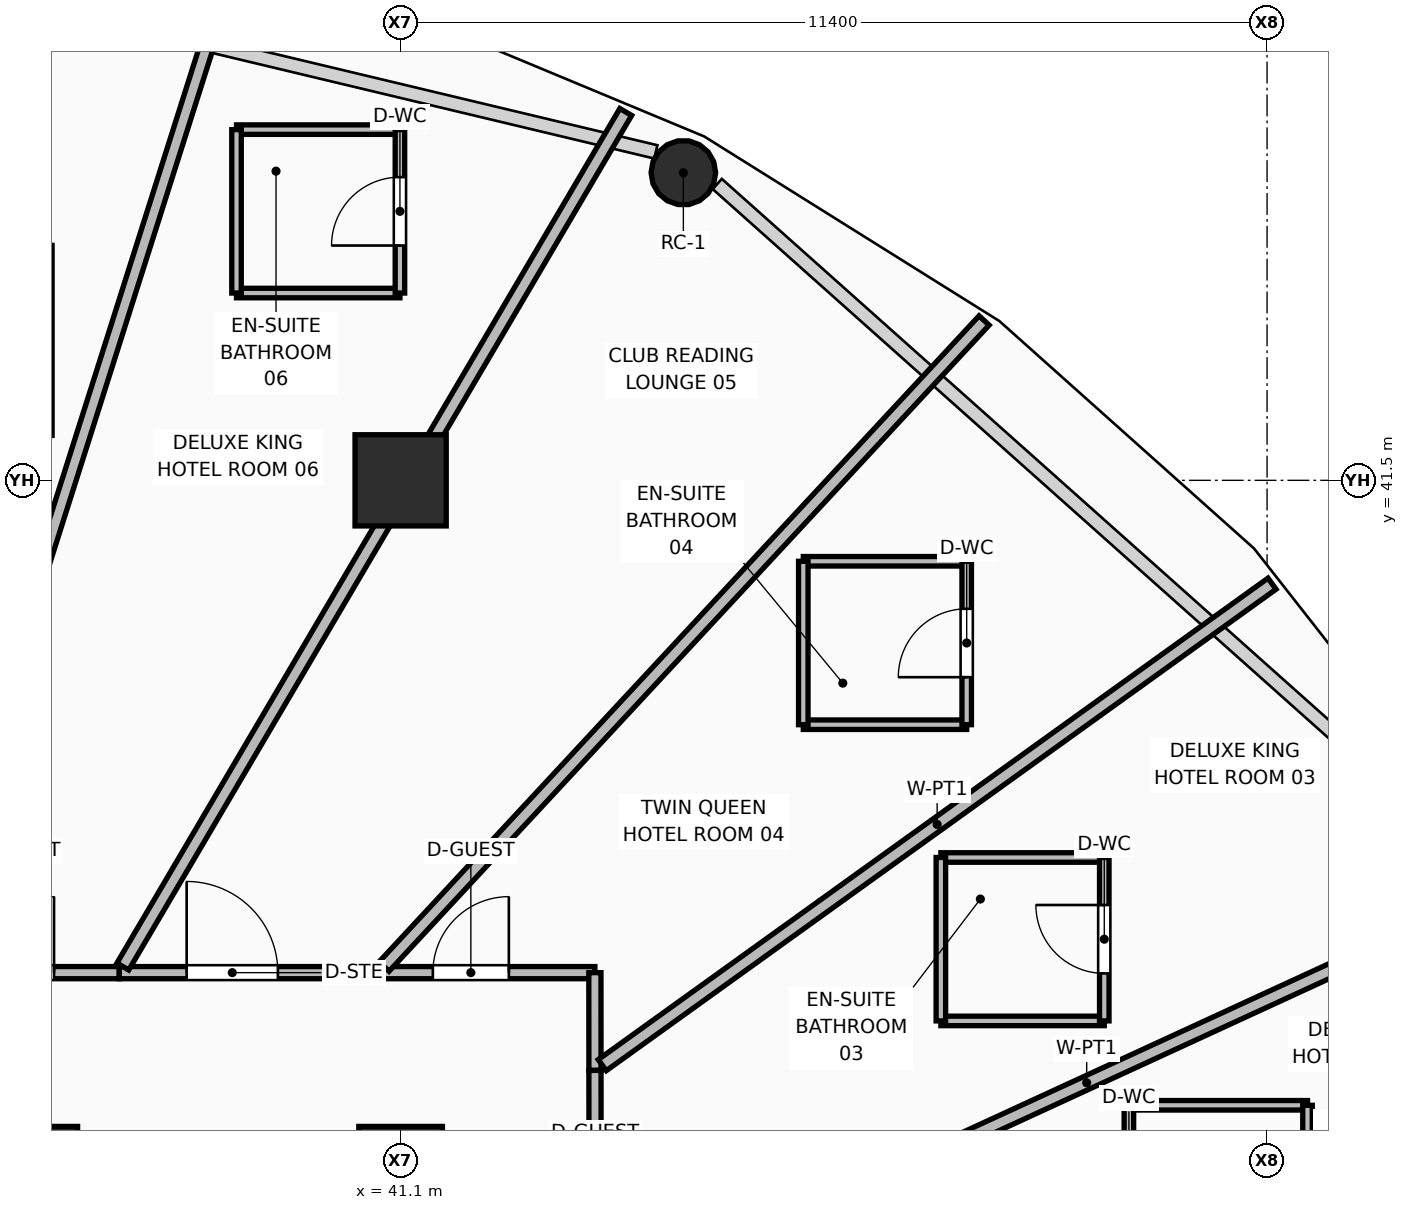
"""IFC4 building model, lengths in metres.
Left out: names, types, materials, properties, quantities, classifications, styles, units other than length and angle.
Written with IfcOpenShell. Run it as: python <this file> out.ifc"""

import sys

from ifc_helpers import new_model, si_unit, direction, frame, frame_2d, origin, origin_2d, place, context, subcontext, project, spatial, rectangle, hollow_rectangle, hollow_circle, extrude, element, fill, save


model = new_model("IFC4")
c1 = context("Model", 3, precision=1e-05, world=origin(), true_north=direction((0.0, 1.0)))
c2 = subcontext(c1, "Body", "Model", "MODEL_VIEW")
j1 = project(units=[si_unit("LENGTHUNIT", "METRE"), si_unit("PLANEANGLEUNIT", "RADIAN")], contexts=[c1])
p1 = place(None, origin())
s1 = spatial("IfcSite", under=j1, at=p1, CompositionType="ELEMENT")
p2 = place(p1, origin())
s2 = spatial("IfcBuilding", under=s1, at=p2, CompositionType="ELEMENT")
p3 = place(p2, frame((0.0, 0.0, 53.25)))
s3 = spatial("IfcBuildingStorey", under=s2, at=p3, CompositionType="ELEMENT", Elevation=53.25)
for number, where, z_axis, x_axis in (
    (1, (36.3, 32.45, 0.0), (0.0, 0.0, 1.0), (1.0, 0.0, 0.0)),
    (2, (41.1, 32.45, 0.0), (0.0, 0.0, 1.0), (1.0, 0.0, 0.0)),
):
    element("IfcColumn", number, at=place(p3, frame(where, z_axis=z_axis, x_axis=x_axis)), inside=s3, PredefinedType="COLUMN", context=c2, shape_type="SweptSolid", body=[
        extrude(rectangle(XDim=1.1, YDim=1.1, at=origin_2d()), origin(), (0.0, 0.0, 1.0), 3.75),
    ])
p4 = place(p3, frame((41.1, 41.5, 0.0), z_axis=(0.0, 0.0, 1.0), x_axis=(1.0, 0.0, 0.0)))
e3 = element("IfcColumn", 3, at=p4, inside=s3, PredefinedType="COLUMN", context=c2, shape_type="SweptSolid", body=[
    extrude(hollow_rectangle(XDim=1.2, YDim=1.2, WallThickness=0.045, at=origin_2d()), origin(), (0.0, 0.0, 1.0), 3.75),
])
p5 = place(p3, frame((44.82, 45.547, 0.0), z_axis=(0.111309599924, 0.172151708361, 0.978761442985), x_axis=(-0.839754063035, 0.542966954443, 0.0)))
e4 = element("IfcColumn", 4, at=p5, inside=s3, PredefinedType="COLUMN", context=c2, shape_type="SweptSolid", body=[
    extrude(hollow_circle(Radius=0.425, WallThickness=0.04, at=origin_2d()), origin(), (0.0, 0.0, 1.0), 3.647),
])
p6 = place(p3, frame((34.681, 35.023, 0.0), z_axis=(0.0, 0.0, 1.0), x_axis=(1.0, 0.0, 0.0)))
e5 = element("IfcWall", 5, at=p6, inside=s3, PredefinedType="PARTITIONING", context=c2, shape_type="SweptSolid", body=[
    extrude(rectangle(XDim=2.717, YDim=0.16, at=frame_2d((1.358, 0.0))), origin(), (0.0, 0.0, 1.0), 3.55),
])
p7 = place(p6, frame((0.859, 0.0, 0.0)))
e6 = element("IfcOpeningElement", 6, at=p7, cuts=e5, PredefinedType="OPENING", context=c2, shape_type="SweptSolid", body=[
    extrude(rectangle(XDim=1.0, YDim=2.1, at=frame_2d((0.5, 1.05))), frame((0.0, 0.09, 0.0), z_axis=(0.0, -1.0, 0.0), x_axis=(1.0, 0.0, 0.0)), (0.0, 0.0, 1.0), 0.18),
])
p8 = place(p3, frame((37.398, 35.023, 0.0), z_axis=(0.0, 0.0, 1.0), x_axis=(1.0, 0.0, 0.0)))
e7 = element("IfcWall", 7, at=p8, inside=s3, PredefinedType="PARTITIONING", context=c2, shape_type="SweptSolid", body=[
    extrude(rectangle(XDim=3.41, YDim=0.16, at=frame_2d((1.705, 0.0))), origin(), (0.0, 0.0, 1.0), 3.55),
])
p9 = place(p8, frame((0.887, 0.0, 0.0)))
e8 = element("IfcOpeningElement", 8, at=p9, cuts=e7, PredefinedType="OPENING", context=c2, shape_type="SweptSolid", body=[
    extrude(rectangle(XDim=1.2, YDim=2.1, at=frame_2d((0.6, 1.05))), frame((0.0, 0.09, 0.0), z_axis=(0.0, -1.0, 0.0), x_axis=(1.0, 0.0, 0.0)), (0.0, 0.0, 1.0), 0.18),
])
p10 = place(p3, frame((40.808, 35.023, 0.0), z_axis=(0.0, 0.0, 1.0), x_axis=(1.0, 0.0, 0.0)))
e9 = element("IfcWall", 9, at=p10, inside=s3, PredefinedType="PARTITIONING", context=c2, shape_type="SweptSolid", body=[
    extrude(rectangle(XDim=2.848, YDim=0.16, at=frame_2d((1.424, 0.0))), origin(), (0.0, 0.0, 1.0), 2.928),
])
p11 = place(p10, frame((0.716, 0.0, 0.0)))
e10 = element("IfcOpeningElement", 10, at=p11, cuts=e9, PredefinedType="OPENING", context=c2, shape_type="SweptSolid", body=[
    extrude(rectangle(XDim=1.0, YDim=2.1, at=frame_2d((0.5, 1.05))), frame((0.0, 0.09, 0.0), z_axis=(0.0, -1.0, 0.0), x_axis=(1.0, 0.0, 0.0)), (0.0, 0.0, 1.0), 0.18),
])
p12 = place(p3, frame((43.656, 35.023, 0.0), z_axis=(0.0, 0.0, 1.0), x_axis=(0.000759445386, -0.999999711621, 0.0)))
e11 = element("IfcWall", 11, at=p12, inside=s3, PredefinedType="PARTITIONING", context=c2, shape_type="SweptSolid", body=[
    extrude(rectangle(XDim=1.286, YDim=0.16, at=frame_2d((0.643, 0.0))), origin(), (0.0, 0.0, 1.0), 3.55),
])
p13 = place(p3, frame((43.657, 33.737, 0.0), z_axis=(0.0, 0.0, 1.0), x_axis=(0.000933270709, -0.999999564503, 0.0)))
e12 = element("IfcWall", 12, at=p13, inside=s3, PredefinedType="PARTITIONING", context=c2, shape_type="SweptSolid", body=[
    extrude(rectangle(XDim=3.139, YDim=0.16, at=frame_2d((1.57, 0.0))), origin(), (0.0, 0.0, 1.0), 2.928),
])
p14 = place(p13, frame((1.559, 0.0, 0.0)))
e13 = element("IfcOpeningElement", 13, at=p14, cuts=e12, PredefinedType="OPENING", context=c2, shape_type="SweptSolid", body=[
    extrude(rectangle(XDim=1.0, YDim=2.1, at=frame_2d((0.5, 1.05))), frame((0.0, 0.09, 0.0), z_axis=(0.0, -1.0, 0.0), x_axis=(1.0, 0.0, 0.0)), (0.0, 0.0, 1.0), 0.18),
])
p15 = place(p3, frame((43.753, 30.64, 0.0), z_axis=(0.0, 0.0, 1.0), x_axis=(0.908354532473, 0.418200960466, 0.0)))
e14 = element("IfcWall", 14, at=p15, inside=s3, PredefinedType="PARTITIONING", context=c2, shape_type="SweptSolid", body=[
    extrude(rectangle(XDim=12.934, YDim=0.18, at=frame_2d((6.467, 0.0))), origin(), (0.0, 0.0, 1.0), 2.775),
])
p16 = place(p3, frame((43.753, 33.806, 0.0), z_axis=(0.0, 0.0, 1.0), x_axis=(0.812000044836, 0.583657371397, 0.0)))
e15 = element("IfcWall", 15, at=p16, inside=s3, PredefinedType="PARTITIONING", context=c2, shape_type="SweptSolid", body=[
    extrude(rectangle(XDim=10.852, YDim=0.18, at=frame_2d((5.426, 0.0))), origin(), (0.0, 0.0, 1.0), 2.775),
])
p17 = place(p3, frame((40.882, 35.103, 0.0), z_axis=(0.0, 0.0, 1.0), x_axis=(0.680551186201, 0.732700541122, 0.0)))
e16 = element("IfcWall", 16, at=p17, inside=s3, PredefinedType="PARTITIONING", context=c2, shape_type="SweptSolid", body=[
    extrude(rectangle(XDim=11.601, YDim=0.18, at=frame_2d((5.8, 0.0))), origin(), (0.0, 0.0, 1.0), 2.775),
])
p18 = place(p3, frame((37.445, 35.103, 0.0), z_axis=(0.0, 0.0, 1.0), x_axis=(0.507217216193, 0.861818249747, 0.0)))
e17 = element("IfcWall", 17, at=p18, inside=s3, PredefinedType="PARTITIONING", context=c2, shape_type="SweptSolid", body=[
    extrude(rectangle(XDim=13.046, YDim=0.18, at=frame_2d((6.523, 0.0))), origin(), (0.0, 0.0, 1.0), 2.775),
])
p19 = place(p3, frame((34.706, 35.103, 0.0), z_axis=(0.0, 0.0, 1.0), x_axis=(0.302538571893, 0.953137142555, 0.0)))
e18 = element("IfcWall", 18, at=p19, inside=s3, PredefinedType="PARTITIONING", context=c2, shape_type="SweptSolid", body=[
    extrude(rectangle(XDim=13.714, YDim=0.18, at=frame_2d((6.857, 0.0))), origin(), (0.0, 0.0, 1.0), 2.775),
])
p20 = place(p3, frame((50.682, 33.278, 0.0), z_axis=(0.0, 0.0, 1.0), x_axis=(1.0, 0.0, 0.0)))
e19 = element("IfcWall", 19, at=p20, inside=s3, PredefinedType="PARTITIONING", context=c2, shape_type="SweptSolid", body=[
    extrude(rectangle(XDim=2.35, YDim=0.125, at=frame_2d((1.175, 0.0))), origin(), (0.0, 0.0, 1.0), 3.55),
])
p21 = place(p3, frame((50.682, 30.978, 0.0), z_axis=(0.0, 0.0, 1.0), x_axis=(0.0, 1.0, 0.0)))
e20 = element("IfcWall", 20, at=p21, inside=s3, PredefinedType="PARTITIONING", context=c2, shape_type="SweptSolid", body=[
    extrude(rectangle(XDim=2.3, YDim=0.125, at=frame_2d((1.15, 0.0))), origin(), (0.0, 0.0, 1.0), 3.55),
])
p22 = place(p21, frame((0.7, 0.0, 0.0)))
e21 = element("IfcOpeningElement", 21, at=p22, cuts=e20, PredefinedType="OPENING", context=c2, shape_type="SweptSolid", body=[
    extrude(rectangle(XDim=0.9, YDim=2.1, at=frame_2d((0.45, 1.05))), frame((0.0, 0.073, 0.0), z_axis=(0.0, -1.0, 0.0), x_axis=(1.0, 0.0, 0.0)), (0.0, 0.0, 1.0), 0.145),
])
p23 = place(p3, frame((53.032, 30.978, 0.0), z_axis=(0.0, 0.0, 1.0), x_axis=(0.0, 1.0, 0.0)))
e22 = element("IfcWall", 22, at=p23, inside=s3, PredefinedType="PARTITIONING", context=c2, shape_type="SweptSolid", body=[
    extrude(rectangle(XDim=2.3, YDim=0.125, at=frame_2d((1.15, 0.0))), origin(), (0.0, 0.0, 1.0), 3.55),
])
for number, where, z_axis, x_axis in (
    (23, (48.208, 34.388, 0.0), (0.0, 0.0, 1.0), (1.0, 0.0, 0.0)),
    (24, (48.208, 36.538, 0.0), (0.0, 0.0, 1.0), (1.0, 0.0, 0.0)),
):
    element("IfcWall", number, at=place(p3, frame(where, z_axis=z_axis, x_axis=x_axis)), inside=s3, PredefinedType="PARTITIONING", context=c2, shape_type="SweptSolid", body=[
        extrude(rectangle(XDim=2.15, YDim=0.125, at=frame_2d((1.075, 0.0))), origin(), (0.0, 0.0, 1.0), 3.55),
    ])
p24 = place(p3, frame((48.208, 34.388, 0.0), z_axis=(0.0, 0.0, 1.0), x_axis=(0.0, 1.0, 0.0)))
e25 = element("IfcWall", 25, at=p24, inside=s3, PredefinedType="PARTITIONING", context=c2, shape_type="SweptSolid", body=[
    extrude(rectangle(XDim=2.15, YDim=0.125, at=frame_2d((1.075, 0.0))), origin(), (0.0, 0.0, 1.0), 2.928),
])
p25 = place(p3, frame((50.358, 34.388, 0.0), z_axis=(0.0, 0.0, 1.0), x_axis=(0.0, 1.0, 0.0)))
e26 = element("IfcWall", 26, at=p25, inside=s3, PredefinedType="PARTITIONING", context=c2, shape_type="SweptSolid", body=[
    extrude(rectangle(XDim=2.15, YDim=0.125, at=frame_2d((1.075, 0.0))), origin(), (0.0, 0.0, 1.0), 2.928),
])
p26 = place(p25, frame((0.625, 0.0, 0.0)))
e27 = element("IfcOpeningElement", 27, at=p26, cuts=e26, PredefinedType="OPENING", context=c2, shape_type="SweptSolid", body=[
    extrude(rectangle(XDim=0.9, YDim=2.1, at=frame_2d((0.45, 1.05))), frame((0.0, 0.073, 0.0), z_axis=(0.0, -1.0, 0.0), x_axis=(1.0, 0.0, 0.0)), (0.0, 0.0, 1.0), 0.145),
])
for number, where, z_axis, x_axis in (
    (28, (46.398, 38.285, 0.0), (0.0, 0.0, 1.0), (1.0, 0.0, 0.0)),
    (29, (46.398, 40.435, 0.0), (0.0, 0.0, 1.0), (1.0, 0.0, 0.0)),
    (30, (46.398, 38.285, 0.0), (0.0, 0.0, 1.0), (0.0, 1.0, 0.0)),
):
    element("IfcWall", number, at=place(p3, frame(where, z_axis=z_axis, x_axis=x_axis)), inside=s3, PredefinedType="PARTITIONING", context=c2, shape_type="SweptSolid", body=[
        extrude(rectangle(XDim=2.15, YDim=0.125, at=frame_2d((1.075, 0.0))), origin(), (0.0, 0.0, 1.0), 3.55),
    ])
p27 = place(p3, frame((48.548, 38.285, 0.0), z_axis=(0.0, 0.0, 1.0), x_axis=(0.0, 1.0, 0.0)))
e31 = element("IfcWall", 31, at=p27, inside=s3, PredefinedType="PARTITIONING", context=c2, shape_type="SweptSolid", body=[
    extrude(rectangle(XDim=2.15, YDim=0.125, at=frame_2d((1.075, 0.0))), origin(), (0.0, 0.0, 1.0), 3.55),
])
p28 = place(p27, frame((0.625, 0.0, 0.0)))
e32 = element("IfcOpeningElement", 32, at=p28, cuts=e31, PredefinedType="OPENING", context=c2, shape_type="SweptSolid", body=[
    extrude(rectangle(XDim=0.9, YDim=2.1, at=frame_2d((0.45, 1.05))), frame((0.0, 0.073, 0.0), z_axis=(0.0, -1.0, 0.0), x_axis=(1.0, 0.0, 0.0)), (0.0, 0.0, 1.0), 0.145),
])
for number, where, z_axis, x_axis in (
    (33, (38.941, 43.964, 0.0), (0.0, 0.0, 1.0), (1.0, 0.0, 0.0)),
    (34, (38.941, 46.114, 0.0), (0.0, 0.0, 1.0), (1.0, 0.0, 0.0)),
):
    element("IfcWall", number, at=place(p3, frame(where, z_axis=z_axis, x_axis=x_axis)), inside=s3, PredefinedType="PARTITIONING", context=c2, shape_type="SweptSolid", body=[
        extrude(rectangle(XDim=2.15, YDim=0.125, at=frame_2d((1.075, 0.0))), origin(), (0.0, 0.0, 1.0), 3.55),
    ])
p29 = place(p3, frame((38.941, 43.964, 0.0), z_axis=(0.0, 0.0, 1.0), x_axis=(0.0, 1.0, 0.0)))
e35 = element("IfcWall", 35, at=p29, inside=s3, PredefinedType="PARTITIONING", context=c2, shape_type="SweptSolid", body=[
    extrude(rectangle(XDim=2.15, YDim=0.125, at=frame_2d((1.075, 0.0))), origin(), (0.0, 0.0, 1.0), 3.55),
])
p30 = place(p3, frame((41.091, 43.964, 0.0), z_axis=(0.0, 0.0, 1.0), x_axis=(0.0, 1.0, 0.0)))
e36 = element("IfcWall", 36, at=p30, inside=s3, PredefinedType="PARTITIONING", context=c2, shape_type="SweptSolid", body=[
    extrude(rectangle(XDim=2.15, YDim=0.125, at=frame_2d((1.075, 0.0))), origin(), (0.0, 0.0, 1.0), 3.55),
])
p31 = place(p30, frame((0.625, 0.0, 0.0)))
e37 = element("IfcOpeningElement", 37, at=p31, cuts=e36, PredefinedType="OPENING", context=c2, shape_type="SweptSolid", body=[
    extrude(rectangle(XDim=0.9, YDim=2.1, at=frame_2d((0.45, 1.05))), frame((0.0, 0.073, 0.0), z_axis=(0.0, -1.0, 0.0), x_axis=(1.0, 0.0, 0.0)), (0.0, 0.0, 1.0), 0.145),
])
p32 = place(p26, origin())
e38 = element("IfcDoor", 38, at=p32, inside=s3, OperationType="SINGLE_SWING_RIGHT", PredefinedType="DOOR", context=c2, shape_type="SweptSolid", body=[
    extrude(rectangle(XDim=0.9, YDim=2.1, at=frame_2d((0.45, 1.05))), frame((0.0, 0.025, 0.0), z_axis=(0.0, -1.0, 0.0), x_axis=(1.0, 0.0, 0.0)), (0.0, 0.0, 1.0), 0.05),
])
fill(e27, e38)
p33 = place(p28, origin())
e39 = element("IfcDoor", 39, at=p33, inside=s3, OperationType="SINGLE_SWING_LEFT", PredefinedType="DOOR", context=c2, shape_type="SweptSolid", body=[
    extrude(rectangle(XDim=0.9, YDim=2.1, at=frame_2d((0.45, 1.05))), frame((0.0, 0.025, 0.0), z_axis=(0.0, -1.0, 0.0), x_axis=(1.0, 0.0, 0.0)), (0.0, 0.0, 1.0), 0.05),
])
fill(e32, e39)
p34 = place(p11, origin())
e40 = element("IfcDoor", 40, at=p34, inside=s3, OperationType="SINGLE_SWING_RIGHT", PredefinedType="DOOR", context=c2, shape_type="SweptSolid", body=[
    extrude(rectangle(XDim=1.0, YDim=2.1, at=frame_2d((0.5, 1.05))), frame((0.0, 0.025, 0.0), z_axis=(0.0, -1.0, 0.0), x_axis=(1.0, 0.0, 0.0)), (0.0, 0.0, 1.0), 0.05),
])
fill(e10, e40)
p35 = place(p9, origin())
e41 = element("IfcDoor", 41, at=p35, inside=s3, OperationType="SINGLE_SWING_LEFT", PredefinedType="DOOR", context=c2, shape_type="SweptSolid", body=[
    extrude(rectangle(XDim=1.2, YDim=2.1, at=frame_2d((0.6, 1.05))), frame((0.0, 0.025, 0.0), z_axis=(0.0, -1.0, 0.0), x_axis=(1.0, 0.0, 0.0)), (0.0, 0.0, 1.0), 0.05),
])
fill(e8, e41)
p36 = place(p31, origin())
e42 = element("IfcDoor", 42, at=p36, inside=s3, OperationType="SINGLE_SWING_LEFT", PredefinedType="DOOR", context=c2, shape_type="SweptSolid", body=[
    extrude(rectangle(XDim=0.9, YDim=2.1, at=frame_2d((0.45, 1.05))), frame((0.0, 0.025, 0.0), z_axis=(0.0, -1.0, 0.0), x_axis=(1.0, 0.0, 0.0)), (0.0, 0.0, 1.0), 0.05),
])
fill(e37, e42)
p37 = place(p7, origin())
e43 = element("IfcDoor", 43, at=p37, inside=s3, OperationType="SINGLE_SWING_RIGHT", PredefinedType="DOOR", context=c2, shape_type="SweptSolid", body=[
    extrude(rectangle(XDim=1.0, YDim=2.1, at=frame_2d((0.5, 1.05))), frame((0.0, 0.025, 0.0), z_axis=(0.0, -1.0, 0.0), x_axis=(1.0, 0.0, 0.0)), (0.0, 0.0, 1.0), 0.05),
])
fill(e6, e43)
save(model, sys.argv[1])
